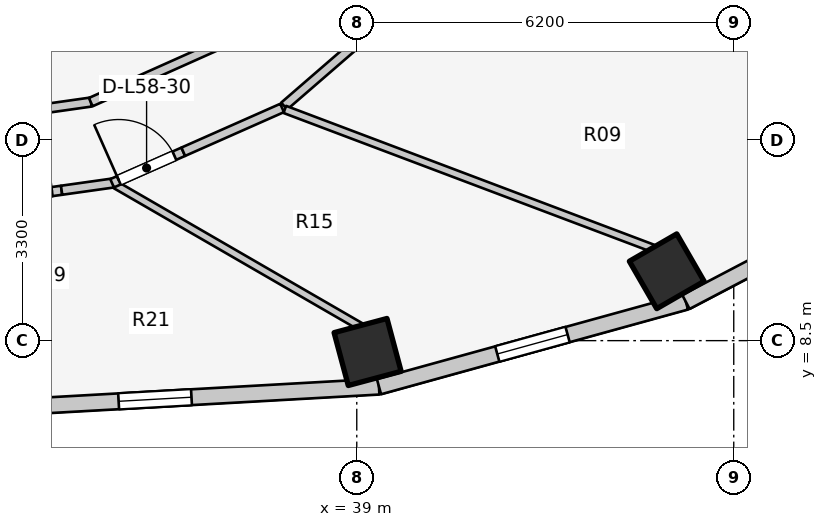
"""IFC4 building model, lengths in metres.
Left out: names, types, materials, properties, quantities, classifications, styles, units other than length and angle.
Written with IfcOpenShell. Run it as: python <this file> out.ifc"""

import sys

from ifc_helpers import new_model, si_unit, direction, frame, frame_2d, origin, origin_2d, place, context, subcontext, project, spatial, rectangle, extrude, element, fill, save


model = new_model("IFC4")
c1 = context("Model", 3, precision=1e-05, world=origin(), true_north=direction((0.0, 1.0)))
c2 = subcontext(c1, "Body", "Model", "MODEL_VIEW")
j1 = project(units=[si_unit("LENGTHUNIT", "METRE"), si_unit("PLANEANGLEUNIT", "RADIAN")], contexts=[c1])
p1 = place(None, origin())
s1 = spatial("IfcSite", under=j1, at=p1, CompositionType="ELEMENT")
p2 = place(p1, origin())
s2 = spatial("IfcBuilding", under=s1, at=p2, CompositionType="ELEMENT")
p3 = place(p2, frame((0.0, 0.0, 190.1)))
s3 = spatial("IfcBuildingStorey", under=s2, at=p3, CompositionType="ELEMENT", Elevation=190.1)
for number, where, z_axis, x_axis in (
    (1, (39.178, 8.313, 0.0), (0.0, 0.0, 1.0), (0.259, -0.966, 0.0)),
    (2, (44.098, 9.641, 0.0), (0.0, 0.0, 1.0), (0.5, -0.866, 0.0)),
):
    element("IfcColumn", number, at=place(p3, frame(where, z_axis=z_axis, x_axis=x_axis)), inside=s3, PredefinedType="COLUMN", context=c2, shape_type="SweptSolid", body=[
        extrude(rectangle(XDim=0.9, YDim=0.9, at=origin_2d()), origin(), (0.0, 0.0, 1.0), 3.1),
    ])
p4 = place(p3, frame((32.0, 7.329, 0.0), z_axis=(0.0, 0.0, 1.0), x_axis=(0.998417906562, 0.056228852534, 0.0)))
e3 = element("IfcWall", 3, at=p4, inside=s3, PredefinedType="STANDARD", context=c2, shape_type="SweptSolid", body=[
    extrude(rectangle(XDim=7.377, YDim=0.26, at=frame_2d((3.688, 0.0))), origin(), (0.0, 0.0, 1.0), 1.22),
])
p5 = place(p4, frame((3.088, 0.0, 0.15)))
e4 = element("IfcOpeningElement", 4, at=p5, cuts=e3, PredefinedType="OPENING", context=c2, shape_type="SweptSolid", body=[
    extrude(rectangle(XDim=1.2, YDim=0.9, at=frame_2d((0.6, 0.45))), frame((0.0, 0.14, 0.0), z_axis=(0.0, -1.0, 0.0), x_axis=(1.0, 0.0, 0.0)), (0.0, 0.0, 1.0), 0.28),
])
p6 = place(p3, frame((39.365, 7.743, 0.0), z_axis=(0.0, 0.0, 1.0), x_axis=(0.963953455704, 0.26607092144, 0.0)))
e5 = element("IfcWall", 5, at=p6, inside=s3, PredefinedType="STANDARD", context=c2, shape_type="SweptSolid", body=[
    extrude(rectangle(XDim=5.237, YDim=0.26, at=frame_2d((2.618, 0.0))), origin(), (0.0, 0.0, 1.0), 1.22),
])
p7 = place(p6, frame((2.018, 0.0, 0.15)))
e6 = element("IfcOpeningElement", 6, at=p7, cuts=e5, PredefinedType="OPENING", context=c2, shape_type="SweptSolid", body=[
    extrude(rectangle(XDim=1.2, YDim=0.9, at=frame_2d((0.6, 0.45))), frame((0.0, 0.14, 0.0), z_axis=(0.0, -1.0, 0.0), x_axis=(1.0, 0.0, 0.0)), (0.0, 0.0, 1.0), 0.28),
])
p8 = place(p3, frame((44.413, 9.137, 0.0), z_axis=(0.0, 0.0, 1.0), x_axis=(0.885660265226, 0.464333818065, 0.0)))
e7 = element("IfcWall", 7, at=p8, inside=s3, PredefinedType="STANDARD", context=c2, shape_type="SweptSolid", body=[
    extrude(rectangle(XDim=4.354, YDim=0.26, at=frame_2d((2.177, 0.0))), origin(), (0.0, 0.0, 1.0), 1.22),
])
p9 = place(p3, frame((37.807, 12.358, 0.0), z_axis=(0.0, 0.0, 1.0), x_axis=(0.756055312247, 0.654507727092, 0.0)))
e8 = element("IfcWall", 8, at=p9, inside=s3, PredefinedType="PARTITIONING", context=c2, shape_type="SweptSolid", body=[
    extrude(rectangle(XDim=2.111, YDim=0.15, at=frame_2d((1.055, 0.0))), origin(), (0.0, 0.0, 1.0), 1.22),
])
p10 = place(p3, frame((33.942, 12.326, 0.0), z_axis=(0.0, 0.0, 1.0), x_axis=(0.990082845611, 0.140484728093, 0.0)))
e9 = element("IfcWall", 9, at=p10, inside=s3, PredefinedType="PARTITIONING", context=c2, shape_type="SweptSolid", body=[
    extrude(rectangle(XDim=0.693, YDim=0.15, at=frame_2d((0.347, 0.0))), origin(), (0.0, 0.0, 1.0), 2.575),
])
p11 = place(p3, frame((34.625, 12.423, 0.0), z_axis=(0.0, 0.0, 1.0), x_axis=(0.912888568324, 0.408208845842, 0.0)))
e10 = element("IfcWall", 10, at=p11, inside=s3, PredefinedType="PARTITIONING", context=c2, shape_type="SweptSolid", body=[
    extrude(rectangle(XDim=2.69, YDim=0.15, at=frame_2d((1.345, 0.0))), origin(), (0.0, 0.0, 1.0), 1.22),
])
p12 = place(p3, frame((35.032, 11.062, 0.0), z_axis=(0.0, 0.0, 1.0), x_axis=(0.865627016774, -0.500689392568, 0.0)))
e11 = element("IfcWall", 11, at=p12, inside=s3, PredefinedType="PARTITIONING", context=c2, shape_type="SweptSolid", body=[
    extrude(rectangle(XDim=4.662, YDim=0.125, at=frame_2d((2.331, 0.0))), origin(), (0.0, 0.0, 1.0), 1.22),
])
p13 = place(p3, frame((37.816, 12.302, 0.0), z_axis=(0.0, 0.0, 1.0), x_axis=(0.935601484289, -0.353057874288, 0.0)))
e12 = element("IfcWall", 12, at=p13, inside=s3, PredefinedType="PARTITIONING", context=c2, shape_type="SweptSolid", body=[
    extrude(rectangle(XDim=6.484, YDim=0.125, at=frame_2d((3.242, 0.0))), origin(), (0.0, 0.0, 1.0), 1.22),
])
p14 = place(p3, frame((32.838, 10.789, 0.0), z_axis=(0.0, 0.0, 1.0), x_axis=(0.990254187593, 0.139271834751, 0.0)))
e13 = element("IfcWall", 13, at=p14, inside=s3, PredefinedType="PARTITIONING", context=c2, shape_type="SweptSolid", body=[
    extrude(rectangle(XDim=1.32, YDim=0.15, at=frame_2d((0.66, 0.0))), origin(), (0.0, 0.0, 1.0), 2.575),
])
p15 = place(p14, frame((0.16, 0.0, 0.0)))
e14 = element("IfcOpeningElement", 14, at=p15, cuts=e13, PredefinedType="OPENING", context=c2, shape_type="SweptSolid", body=[
    extrude(rectangle(XDim=1.0, YDim=2.1, at=frame_2d((0.5, 1.05))), frame((0.0, 0.085, 0.0), z_axis=(0.0, -1.0, 0.0), x_axis=(1.0, 0.0, 0.0)), (0.0, 0.0, 1.0), 0.17),
])
p16 = place(p3, frame((34.146, 10.973, 0.0), z_axis=(0.0, 0.0, 1.0), x_axis=(0.990238723834, 0.139381741342, 0.0)))
e15 = element("IfcWall", 15, at=p16, inside=s3, PredefinedType="PARTITIONING", context=c2, shape_type="SweptSolid", body=[
    extrude(rectangle(XDim=0.855, YDim=0.15, at=frame_2d((0.427, 0.0))), origin(), (0.0, 0.0, 1.0), 2.575),
])
p17 = place(p3, frame((34.976, 11.088, 0.0), z_axis=(0.0, 0.0, 1.0), x_axis=(0.91435342481, 0.40491704649, 0.0)))
e16 = element("IfcWall", 16, at=p17, inside=s3, PredefinedType="PARTITIONING", context=c2, shape_type="SweptSolid", body=[
    extrude(rectangle(XDim=1.28, YDim=0.15, at=frame_2d((0.64, 0.0))), origin(), (0.0, 0.0, 1.0), 2.16),
])
p18 = place(p17, frame((0.12, 0.0, 0.0)))
e17 = element("IfcOpeningElement", 17, at=p18, cuts=e16, PredefinedType="OPENING", context=c2, shape_type="SweptSolid", body=[
    extrude(rectangle(XDim=1.0, YDim=2.1, at=frame_2d((0.5, 1.05))), frame((0.0, 0.085, 0.0), z_axis=(0.0, -1.0, 0.0), x_axis=(1.0, 0.0, 0.0)), (0.0, 0.0, 1.0), 0.17),
])
p19 = place(p3, frame((36.147, 11.606, 0.0), z_axis=(0.0, 0.0, 1.0), x_axis=(0.914303617865, 0.405029498135, 0.0)))
e18 = element("IfcWall", 18, at=p19, inside=s3, PredefinedType="PARTITIONING", context=c2, shape_type="SweptSolid", body=[
    extrude(rectangle(XDim=1.778, YDim=0.15, at=frame_2d((0.889, 0.0))), origin(), (0.0, 0.0, 1.0), 1.22),
])
p20 = place(p5, origin())
e19 = element("IfcWindow", 19, at=p20, inside=s3, PartitioningType="SINGLE_PANEL", PredefinedType="WINDOW", context=c2, shape_type="SweptSolid", body=[
    extrude(rectangle(XDim=1.2, YDim=0.9, at=frame_2d((0.6, 0.45))), frame((0.0, 0.03, 0.0), z_axis=(0.0, -1.0, 0.0), x_axis=(1.0, 0.0, 0.0)), (0.0, 0.0, 1.0), 0.06),
])
fill(e4, e19)
p21 = place(p7, origin())
e20 = element("IfcWindow", 20, at=p21, inside=s3, PartitioningType="SINGLE_PANEL", PredefinedType="WINDOW", context=c2, shape_type="SweptSolid", body=[
    extrude(rectangle(XDim=1.2, YDim=0.9, at=frame_2d((0.6, 0.45))), frame((0.0, 0.03, 0.0), z_axis=(0.0, -1.0, 0.0), x_axis=(1.0, 0.0, 0.0)), (0.0, 0.0, 1.0), 0.06),
])
fill(e6, e20)
p22 = place(p15, origin())
e21 = element("IfcDoor", 21, at=p22, inside=s3, OperationType="SINGLE_SWING_RIGHT", PredefinedType="DOOR", context=c2, shape_type="SweptSolid", body=[
    extrude(rectangle(XDim=1.0, YDim=2.1, at=frame_2d((0.5, 1.05))), frame((0.0, 0.025, 0.0), z_axis=(0.0, -1.0, 0.0), x_axis=(1.0, 0.0, 0.0)), (0.0, 0.0, 1.0), 0.05),
])
fill(e14, e21)
p23 = place(p18, origin())
e22 = element("IfcDoor", 22, at=p23, inside=s3, OperationType="SINGLE_SWING_LEFT", PredefinedType="DOOR", context=c2, shape_type="SweptSolid", body=[
    extrude(rectangle(XDim=1.0, YDim=2.1, at=frame_2d((0.5, 1.05))), frame((0.0, 0.025, 0.0), z_axis=(0.0, -1.0, 0.0), x_axis=(1.0, 0.0, 0.0)), (0.0, 0.0, 1.0), 0.05),
])
fill(e17, e22)
save(model, sys.argv[1])
